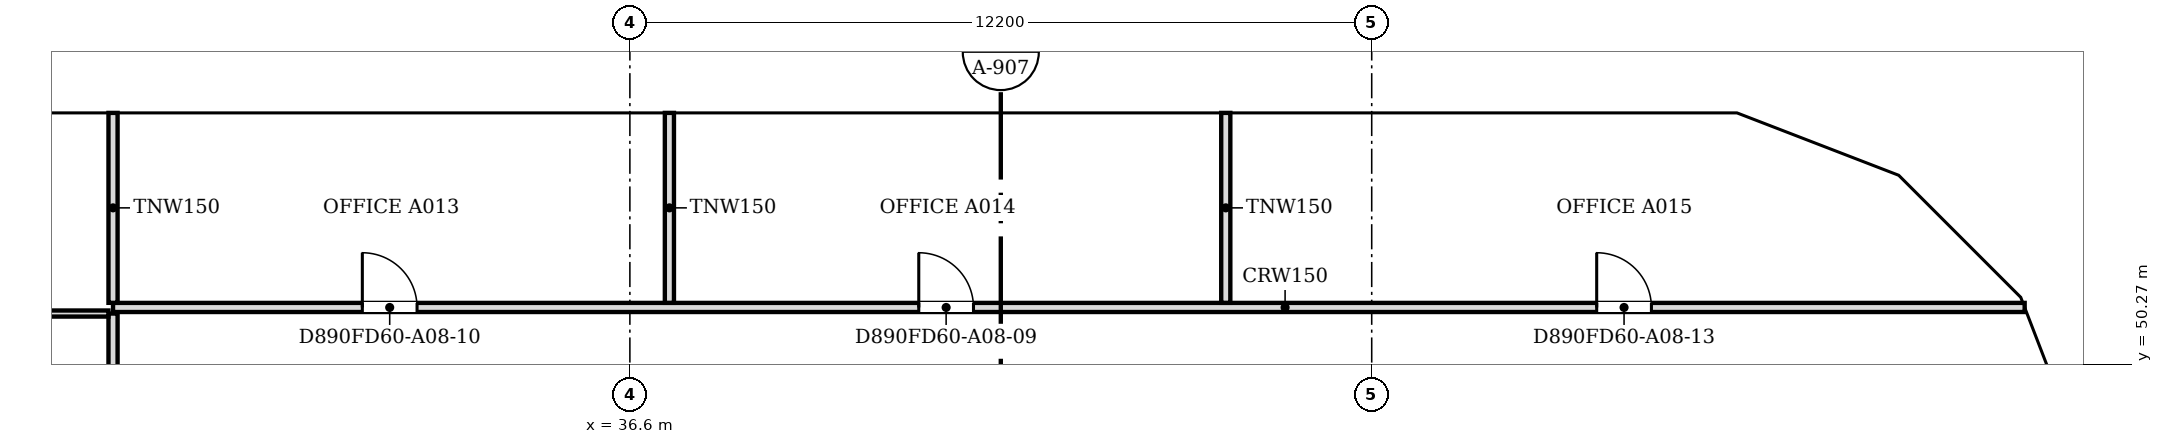
"""IFC4 building model, lengths in metres.
Left out: names, types, materials, properties, quantities, classifications, styles, units other than length and angle.
Written with IfcOpenShell. Run it as: python <this file> out.ifc"""

import sys

from ifc_helpers import new_model, si_unit, direction, frame, frame_2d, origin, place, context, subcontext, project, spatial, polyline, rectangle, outline, extrude, faceted_brep, source, transform, mapped, element, fill, save


model = new_model("IFC4")
c1 = context("Model", 3, precision=1e-05, world=origin(), true_north=direction((0.0, 1.0)))
c2 = subcontext(c1, "Body", "Model", "MODEL_VIEW")
j1 = project(units=[si_unit("LENGTHUNIT", "METRE"), si_unit("PLANEANGLEUNIT", "RADIAN")], contexts=[c1])
p1 = place(None, origin())
s1 = spatial("IfcSite", under=j1, at=p1, CompositionType="ELEMENT")
p2 = place(p1, origin())
s2 = spatial("IfcBuilding", under=s1, at=p2, CompositionType="ELEMENT")
p3 = place(p2, frame((0.0, 0.0, 91.4)))
s3 = spatial("IfcBuildingStorey", under=s2, at=p3, CompositionType="ELEMENT", Elevation=91.4)
m1 = source(origin(), c2, "Body", "Brep", [
    faceted_brep([(2.95, -0.25, 0.0), (3.003, -0.25, 0.068), (3.003, -0.25, 7.531), (2.95, -0.25, 7.6), (0.0, -0.25, 3.8), (0.047, 0.25, 3.86), (2.898, 0.25, 7.532), (2.898, 0.25, 0.068), (0.047, 0.25, 3.74), (2.95, 0.0, 0.0), (2.95, 0.0, 7.6), (0.0, 0.0, 3.8)], [[[0, 1, 2, 3, 4]], [[5, 6, 7, 8]], [[1, 0, 9]], [[10, 3, 2]], [[6, 5, 11, 4, 3, 10]], [[8, 7, 9, 0, 4, 11]], [[8, 11, 5]], [[1, 9, 7, 6, 10, 2]]]),
])
p4 = place(p3, frame((60.75, 48.753, -3.8), z_axis=(0.0, 0.0, 1.0), x_axis=(-0.35992665181, 0.932980602862, 0.0)))
e1 = element("IfcWall", 1, at=p4, inside=s3, PredefinedType="SOLIDWALL", context=c2, shape_type="MappedRepresentation", body=[
    mapped(m1, transform((0.0, 0.0, 0.0), scale=1.0)),
])
m2 = source(origin(), c2, "Body", "SweptSolid", [
    extrude(outline(polyline([(2.75, 6.935), (0.316, 3.8), (2.75, 0.665), (2.75, 6.935)])), frame((0.0, 0.26, 0.0), z_axis=(0.0, -1.0, 0.0), x_axis=(1.0, 0.0, 0.0)), (0.0, 0.0, 1.0), 0.52),
])
p5 = place(p4, origin())
e2 = element("IfcOpeningElement", 2, at=p5, cuts=e1, PredefinedType="OPENING", context=c2, shape_type="MappedRepresentation", body=[
    mapped(m2, transform((0.0, 0.0, 0.0), scale=1.0)),
])
m3 = source(origin(), c2, "Body", "Brep", [
    faceted_brep([(0.053, -0.25, 0.0), (2.997, -0.25, 3.8), (0.053, -0.25, 7.6), (0.0, -0.25, 7.532), (0.0, -0.25, 0.068), (0.106, 0.25, 7.531), (2.944, 0.25, 3.868), (2.944, 0.25, 3.732), (0.106, 0.25, 0.068), (2.997, 0.0, 3.8), (0.053, 0.0, 0.0), (0.053, 0.0, 7.6)], [[[0, 1, 2, 3, 4]], [[5, 6, 7, 8]], [[8, 7, 9, 1, 0, 10]], [[6, 5, 11, 2, 1, 9]], [[3, 2, 11]], [[10, 0, 4]], [[8, 10, 4, 3, 11, 5]], [[9, 7, 6]]]),
])
p6 = place(p3, frame((59.726, 51.469, -3.8), z_axis=(0.0, 0.0, 1.0), x_axis=(-0.707106781187, 0.707106781187, 0.0)))
e3 = element("IfcWall", 3, at=p6, inside=s3, PredefinedType="SOLIDWALL", context=c2, shape_type="MappedRepresentation", body=[
    mapped(m3, transform((0.0, 0.0, 0.0), scale=1.0)),
])
m4 = source(origin(), c2, "Body", "SweptSolid", [
    extrude(outline(polyline([(0.253, 0.666), (2.681, 3.8), (0.253, 6.934), (0.253, 0.666)])), frame((0.0, 0.26, 0.0), z_axis=(0.0, -1.0, 0.0), x_axis=(1.0, 0.0, 0.0)), (0.0, 0.0, 1.0), 0.52),
])
p7 = place(p6, origin())
e4 = element("IfcOpeningElement", 4, at=p7, cuts=e3, PredefinedType="OPENING", context=c2, shape_type="MappedRepresentation", body=[
    mapped(m4, transform((0.0, 0.0, 0.0), scale=1.0)),
])
m5 = source(origin(), c2, "Body", "Brep", [
    faceted_brep([(2.95, -0.25, 0.0), (2.997, -0.25, 0.059), (2.997, -0.25, 7.541), (2.95, -0.25, 7.6), (0.0, -0.25, 3.8), (0.053, 0.25, 3.868), (2.904, 0.25, 7.54), (2.904, 0.25, 0.06), (0.053, 0.25, 3.732), (2.95, 0.0, 0.0), (2.95, 0.0, 7.6), (0.0, 0.0, 3.8)], [[[0, 1, 2, 3, 4]], [[5, 6, 7, 8]], [[1, 0, 9]], [[10, 3, 2]], [[6, 5, 11, 4, 3, 10]], [[8, 7, 9, 0, 4, 11]], [[8, 11, 5]], [[1, 9, 7, 6, 10, 2]]]),
])
p8 = place(p3, frame((57.606, 53.588, -3.8), z_axis=(0.0, 0.0, 1.0), x_axis=(-0.932990326376, 0.359901446078, 0.0)))
e5 = element("IfcWall", 5, at=p8, inside=s3, PredefinedType="SOLIDWALL", context=c2, shape_type="MappedRepresentation", body=[
    mapped(m5, transform((0.0, 0.0, 0.0), scale=1.0)),
])
p9 = place(p8, origin())
e6 = element("IfcOpeningElement", 6, at=p9, cuts=e5, PredefinedType="OPENING", context=c2, shape_type="MappedRepresentation", body=[
    mapped(m2, transform((0.0, 0.0, 0.0), scale=1.0)),
])
m6 = source(origin(), c2, "Body", "Brep", [
    faceted_brep([(0.047, -0.25, 0.0), (3.05, -0.25, 3.8), (0.047, -0.25, 7.6), (0.0, -0.25, 7.54), (0.0, -0.25, 0.06), (0.093, 0.25, 7.541), (3.05, 0.25, 3.8), (0.093, 0.25, 0.059), (0.047, 0.0, 0.0), (0.047, 0.0, 7.6)], [[[0, 1, 2, 3, 4]], [[5, 6, 7]], [[7, 6, 1, 0, 8]], [[6, 5, 9, 2, 1]], [[3, 2, 9]], [[8, 0, 4]], [[7, 8, 4, 3, 9, 5]]]),
])
p10 = place(p3, frame((54.9, 54.65, -3.8), z_axis=(0.0, 0.0, 1.0), x_axis=(-1.0, 0.0, 0.0)))
e7 = element("IfcWall", 7, at=p10, inside=s3, PredefinedType="SOLIDWALL", context=c2, shape_type="MappedRepresentation", body=[
    mapped(m6, transform((0.0, 0.0, 0.0), scale=1.0)),
])
m7 = source(origin(), c2, "Body", "SweptSolid", [
    extrude(outline(polyline([(0.247, 0.656), (2.731, 3.8), (0.247, 6.944), (0.247, 0.656)])), frame((0.0, 0.26, 0.0), z_axis=(0.0, -1.0, 0.0), x_axis=(1.0, 0.0, 0.0)), (0.0, 0.0, 1.0), 0.52),
])
p11 = place(p10, origin())
e8 = element("IfcOpeningElement", 8, at=p11, cuts=e7, PredefinedType="OPENING", context=c2, shape_type="MappedRepresentation", body=[
    mapped(m7, transform((0.0, 0.0, 0.0), scale=1.0)),
])
m8 = source(origin(), c2, "Body", "SweptSolid", [
    extrude(outline(polyline([(3.05, 0.0), (6.1, 3.8), (3.05, 7.6), (0.0, 3.8), (3.05, 0.0)])), frame((0.0, 0.25, 0.0), z_axis=(0.0, -1.0, 0.0), x_axis=(1.0, 0.0, 0.0)), (0.0, 0.0, 1.0), 0.5),
])
p12 = place(p3, frame((51.85, 54.65, -3.8), z_axis=(0.0, 0.0, 1.0), x_axis=(-1.0, 0.0, 0.0)))
e9 = element("IfcWall", 9, at=p12, inside=s3, PredefinedType="SOLIDWALL", context=c2, shape_type="MappedRepresentation", body=[
    mapped(m8, transform((0.0, 0.0, 0.0), scale=1.0)),
])
m9 = source(origin(), c2, "Body", "SweptSolid", [
    extrude(outline(polyline([(3.05, 0.399), (5.78, 3.8), (3.05, 7.2), (0.321, 3.8), (3.05, 0.399)])), frame((0.0, 0.26, 0.0), z_axis=(0.0, -1.0, 0.0), x_axis=(1.0, 0.0, 0.0)), (0.0, 0.0, 1.0), 0.52),
])
p13 = place(p12, origin())
e10 = element("IfcOpeningElement", 10, at=p13, cuts=e9, PredefinedType="OPENING", context=c2, shape_type="MappedRepresentation", body=[
    mapped(m9, transform((0.0, 0.0, 0.0), scale=1.0)),
])
p14 = place(p3, frame((45.75, 54.65, -3.8), z_axis=(0.0, 0.0, 1.0), x_axis=(-1.0, 0.0, 0.0)))
e11 = element("IfcWall", 11, at=p14, inside=s3, PredefinedType="SOLIDWALL", context=c2, shape_type="MappedRepresentation", body=[
    mapped(m8, transform((0.0, 0.0, 0.0), scale=1.0)),
])
p15 = place(p14, origin())
e12 = element("IfcOpeningElement", 12, at=p15, cuts=e11, PredefinedType="OPENING", context=c2, shape_type="MappedRepresentation", body=[
    mapped(m9, transform((0.0, 0.0, 0.0), scale=1.0)),
])
m10 = source(origin(), c2, "Body", "Brep", [
    faceted_brep([(3.05, -0.25, 0.0), (6.1, -0.25, 3.8), (6.1, -0.25, 3.8), (3.05, -0.25, 7.6), (0.0, -0.25, 3.8), (0.0, 0.25, 3.8), (3.05, 0.25, 7.6), (6.1, 0.25, 3.8), (6.1, 0.25, 3.8), (3.05, 0.25, 0.0)], [[[0, 1, 2, 3, 4]], [[5, 6, 7, 8, 9]], [[9, 8, 1, 0]], [[7, 6, 3, 2]], [[6, 5, 4, 3]], [[5, 9, 0, 4]], [[1, 8, 7, 2]]]),
])
p16 = place(p3, frame((39.65, 54.65, -3.8), z_axis=(0.0, 0.0, 1.0), x_axis=(-1.0, 0.0, 0.0)))
e13 = element("IfcWall", 13, at=p16, inside=s3, PredefinedType="SOLIDWALL", context=c2, shape_type="MappedRepresentation", body=[
    mapped(m10, transform((0.0, 0.0, 0.0), scale=1.0)),
])
p17 = place(p16, origin())
e14 = element("IfcOpeningElement", 14, at=p17, cuts=e13, PredefinedType="OPENING", context=c2, shape_type="MappedRepresentation", body=[
    mapped(m9, transform((0.0, 0.0, 0.0), scale=1.0)),
])
p18 = place(p3, frame((33.55, 54.65, -3.8), z_axis=(0.0, 0.0, 1.0), x_axis=(-1.0, 0.0, 0.0)))
e15 = element("IfcWall", 15, at=p18, inside=s3, PredefinedType="SOLIDWALL", context=c2, shape_type="MappedRepresentation", body=[
    mapped(m8, transform((0.0, 0.0, 0.0), scale=1.0)),
])
p19 = place(p18, origin())
e16 = element("IfcOpeningElement", 16, at=p19, cuts=e15, PredefinedType="OPENING", context=c2, shape_type="MappedRepresentation", body=[
    mapped(m9, transform((0.0, 0.0, 0.0), scale=1.0)),
])
p20 = place(p3, frame((27.45, 54.65, -3.8), z_axis=(0.0, 0.0, 1.0), x_axis=(-1.0, 0.0, 0.0)))
e17 = element("IfcWall", 17, at=p20, inside=s3, PredefinedType="SOLIDWALL", context=c2, shape_type="MappedRepresentation", body=[
    mapped(m10, transform((0.0, 0.0, 0.0), scale=1.0)),
])
p21 = place(p20, origin())
e18 = element("IfcOpeningElement", 18, at=p21, cuts=e17, PredefinedType="OPENING", context=c2, shape_type="MappedRepresentation", body=[
    mapped(m9, transform((0.0, 0.0, 0.0), scale=1.0)),
])
p22 = place(p2, frame((0.0, 0.0, 95.2)))
s4 = spatial("IfcBuildingStorey", under=s2, at=p22, CompositionType="ELEMENT", Elevation=95.2)
m11 = source(origin(), c2, "Body", "Brep", [
    faceted_brep([(0.047, -0.25, 0.0), (2.997, -0.25, 3.8), (0.047, -0.25, 7.6), (0.0, -0.25, 7.541), (0.0, -0.25, 0.059), (0.093, 0.25, 7.54), (2.944, 0.25, 3.868), (2.944, 0.25, 3.732), (0.093, 0.25, 0.06), (2.997, 0.0, 3.8), (0.047, 0.0, 0.0), (0.047, 0.0, 7.6)], [[[0, 1, 2, 3, 4]], [[5, 6, 7, 8]], [[8, 7, 9, 1, 0, 10]], [[6, 5, 11, 2, 1, 9]], [[3, 2, 11]], [[10, 0, 4]], [[8, 10, 4, 3, 11, 5]], [[9, 7, 6]]]),
])
p23 = place(p22, frame((60.767, 48.71, -3.8), z_axis=(0.0, 0.0, 1.0), x_axis=(-0.359901446078, 0.932990326376, 0.0)))
e19 = element("IfcWall", 19, at=p23, inside=s4, PredefinedType="SOLIDWALL", context=c2, shape_type="MappedRepresentation", body=[
    mapped(m11, transform((0.0, 0.0, 0.0), scale=1.0)),
])
m12 = source(origin(), c2, "Body", "SweptSolid", [
    extrude(outline(polyline([(0.247, 0.665), (2.681, 3.8), (0.247, 6.935), (0.247, 0.665)])), frame((0.0, 0.26, 0.0), z_axis=(0.0, -1.0, 0.0), x_axis=(1.0, 0.0, 0.0)), (0.0, 0.0, 1.0), 0.52),
])
p24 = place(p23, origin())
e20 = element("IfcOpeningElement", 20, at=p24, cuts=e19, PredefinedType="OPENING", context=c2, shape_type="MappedRepresentation", body=[
    mapped(m12, transform((0.0, 0.0, 0.0), scale=1.0)),
])
m13 = source(origin(), c2, "Body", "Brep", [
    faceted_brep([(2.944, -0.25, 0.0), (2.997, -0.25, 0.068), (2.997, -0.25, 7.532), (2.944, -0.25, 7.6), (0.0, -0.25, 3.8), (0.053, 0.25, 3.868), (2.891, 0.25, 7.532), (2.891, 0.25, 0.068), (0.053, 0.25, 3.732), (2.944, 0.0, 0.0), (2.944, 0.0, 7.6), (0.0, 0.0, 3.8)], [[[0, 1, 2, 3, 4]], [[5, 6, 7, 8]], [[1, 0, 9]], [[10, 3, 2]], [[6, 5, 11, 4, 3, 10]], [[8, 7, 9, 0, 4, 11]], [[8, 11, 5]], [[1, 9, 7, 6, 10, 2]]]),
])
p25 = place(p22, frame((59.688, 51.506, -3.8), z_axis=(0.0, 0.0, 1.0), x_axis=(-0.707106781187, 0.707106781187, 0.0)))
e21 = element("IfcWall", 21, at=p25, inside=s4, PredefinedType="SOLIDWALL", context=c2, shape_type="MappedRepresentation", body=[
    mapped(m13, transform((0.0, 0.0, 0.0), scale=1.0)),
])
m14 = source(origin(), c2, "Body", "SweptSolid", [
    extrude(outline(polyline([(2.744, 6.934), (0.316, 3.8), (2.744, 0.667), (2.744, 6.934)])), frame((0.0, 0.26, 0.0), z_axis=(0.0, -1.0, 0.0), x_axis=(1.0, 0.0, 0.0)), (0.0, 0.0, 1.0), 0.52),
])
p26 = place(p25, origin())
e22 = element("IfcOpeningElement", 22, at=p26, cuts=e21, PredefinedType="OPENING", context=c2, shape_type="MappedRepresentation", body=[
    mapped(m14, transform((0.0, 0.0, 0.0), scale=1.0)),
])
m15 = source(origin(), c2, "Body", "Brep", [
    faceted_brep([(0.053, -0.25, 0.0), (3.003, -0.25, 3.8), (0.053, -0.25, 7.6), (0.0, -0.25, 7.532), (0.0, -0.25, 0.068), (0.106, 0.25, 7.532), (2.957, 0.25, 3.86), (2.957, 0.25, 3.74), (0.106, 0.25, 0.068), (3.003, 0.0, 3.8), (0.053, 0.0, 0.0), (0.053, 0.0, 7.6)], [[[0, 1, 2, 3, 4]], [[5, 6, 7, 8]], [[8, 7, 9, 1, 0, 10]], [[6, 5, 11, 2, 1, 9]], [[3, 2, 11]], [[10, 0, 4]], [[8, 10, 4, 3, 11, 5]], [[9, 7, 6]]]),
])
p27 = place(p22, frame((57.656, 53.569, -3.8), z_axis=(0.0, 0.0, 1.0), x_axis=(-0.933007896601, 0.359855894603, 0.0)))
e23 = element("IfcWall", 23, at=p27, inside=s4, PredefinedType="SOLIDWALL", context=c2, shape_type="MappedRepresentation", body=[
    mapped(m15, transform((0.0, 0.0, 0.0), scale=1.0)),
])
m16 = source(origin(), c2, "Body", "SweptSolid", [
    extrude(outline(polyline([(0.253, 0.665), (2.687, 3.8), (0.253, 6.935), (0.253, 0.665)])), frame((0.0, 0.26, 0.0), z_axis=(0.0, -1.0, 0.0), x_axis=(1.0, 0.0, 0.0)), (0.0, 0.0, 1.0), 0.52),
])
p28 = place(p27, origin())
e24 = element("IfcOpeningElement", 24, at=p28, cuts=e23, PredefinedType="OPENING", context=c2, shape_type="MappedRepresentation", body=[
    mapped(m16, transform((0.0, 0.0, 0.0), scale=1.0)),
])
m17 = source(origin(), c2, "Body", "Brep", [
    faceted_brep([(3.003, -0.25, 0.0), (6.053, -0.25, 3.8), (3.003, -0.25, 7.6), (0.0, -0.25, 3.8), (0.047, 0.25, 3.859), (3.003, 0.25, 7.6), (6.053, 0.25, 3.8), (3.003, 0.25, 0.0), (0.047, 0.25, 3.741), (0.0, 0.0, 3.8)], [[[0, 1, 2, 3]], [[4, 5, 6, 7, 8]], [[7, 6, 1, 0]], [[6, 5, 2, 1]], [[5, 4, 9, 3, 2]], [[8, 7, 0, 3, 9]], [[8, 9, 4]]]),
])
p29 = place(p22, frame((54.854, 54.65, -3.8), z_axis=(0.0, 0.0, 1.0), x_axis=(-1.0, 0.0, 0.0)))
e25 = element("IfcWall", 25, at=p29, inside=s4, PredefinedType="SOLIDWALL", context=c2, shape_type="MappedRepresentation", body=[
    mapped(m17, transform((0.0, 0.0, 0.0), scale=1.0)),
])
m18 = source(origin(), c2, "Body", "SweptSolid", [
    extrude(outline(polyline([(3.005, 0.401), (5.733, 3.8), (3.005, 7.199), (0.319, 3.8), (3.005, 0.401)])), frame((0.0, 0.26, 0.0), z_axis=(0.0, -1.0, 0.0), x_axis=(1.0, 0.0, 0.0)), (0.0, 0.0, 1.0), 0.52),
])
p30 = place(p29, origin())
e26 = element("IfcOpeningElement", 26, at=p30, cuts=e25, PredefinedType="OPENING", context=c2, shape_type="MappedRepresentation", body=[
    mapped(m18, transform((0.0, 0.0, 0.0), scale=1.0)),
])
m19 = source(origin(), c2, "Body", "SweptSolid", [
    extrude(outline(polyline([(3.05, 0.0), (6.1, 3.8), (3.05, 7.6), (0.0, 3.8), (3.05, 0.0)])), frame((0.0, 0.25, 0.0), z_axis=(0.0, -1.0, 0.0), x_axis=(1.0, 0.0, 0.0)), (0.0, 0.0, 1.0), 0.5),
])
p31 = place(p22, frame((48.8, 54.65, -3.8), z_axis=(0.0, 0.0, 1.0), x_axis=(-1.0, 0.0, 0.0)))
e27 = element("IfcWall", 27, at=p31, inside=s4, PredefinedType="SOLIDWALL", context=c2, shape_type="MappedRepresentation", body=[
    mapped(m19, transform((0.0, 0.0, 0.0), scale=1.0)),
])
m20 = source(origin(), c2, "Body", "SweptSolid", [
    extrude(outline(polyline([(3.05, 0.399), (5.78, 3.8), (3.05, 7.201), (0.321, 3.8), (3.05, 0.399)])), frame((0.0, 0.26, 0.0), z_axis=(0.0, -1.0, 0.0), x_axis=(1.0, 0.0, 0.0)), (0.0, 0.0, 1.0), 0.52),
])
p32 = place(p31, origin())
e28 = element("IfcOpeningElement", 28, at=p32, cuts=e27, PredefinedType="OPENING", context=c2, shape_type="MappedRepresentation", body=[
    mapped(m20, transform((0.0, 0.0, 0.0), scale=1.0)),
])
m21 = source(origin(), c2, "Body", "Brep", [
    faceted_brep([(3.05, -0.25, 0.0), (6.1, -0.25, 3.8), (6.1, -0.25, 3.8), (3.05, -0.25, 7.6), (0.0, -0.25, 3.8), (0.0, 0.25, 3.8), (3.05, 0.25, 7.6), (6.1, 0.25, 3.8), (6.1, 0.25, 3.8), (3.05, 0.25, 0.0)], [[[0, 1, 2, 3, 4]], [[5, 6, 7, 8, 9]], [[9, 8, 1, 0]], [[7, 6, 3, 2]], [[6, 5, 4, 3]], [[5, 9, 0, 4]], [[1, 8, 7, 2]]]),
])
p33 = place(p22, frame((42.7, 54.65, -3.8), z_axis=(0.0, 0.0, 1.0), x_axis=(-1.0, 0.0, 0.0)))
e29 = element("IfcWall", 29, at=p33, inside=s4, PredefinedType="SOLIDWALL", context=c2, shape_type="MappedRepresentation", body=[
    mapped(m21, transform((0.0, 0.0, 0.0), scale=1.0)),
])
p34 = place(p33, origin())
e30 = element("IfcOpeningElement", 30, at=p34, cuts=e29, PredefinedType="OPENING", context=c2, shape_type="MappedRepresentation", body=[
    mapped(m20, transform((0.0, 0.0, 0.0), scale=1.0)),
])
p35 = place(p22, frame((36.6, 54.65, -3.8), z_axis=(0.0, 0.0, 1.0), x_axis=(-1.0, 0.0, 0.0)))
e31 = element("IfcWall", 31, at=p35, inside=s4, PredefinedType="SOLIDWALL", context=c2, shape_type="MappedRepresentation", body=[
    mapped(m19, transform((0.0, 0.0, 0.0), scale=1.0)),
])
p36 = place(p35, origin())
e32 = element("IfcOpeningElement", 32, at=p36, cuts=e31, PredefinedType="OPENING", context=c2, shape_type="MappedRepresentation", body=[
    mapped(m20, transform((0.0, 0.0, 0.0), scale=1.0)),
])
p37 = place(p22, frame((30.5, 54.65, -3.8), z_axis=(0.0, 0.0, 1.0), x_axis=(-1.0, 0.0, 0.0)))
e33 = element("IfcWall", 33, at=p37, inside=s4, PredefinedType="SOLIDWALL", context=c2, shape_type="MappedRepresentation", body=[
    mapped(m19, transform((0.0, 0.0, 0.0), scale=1.0)),
])
p38 = place(p37, origin())
e34 = element("IfcOpeningElement", 34, at=p38, cuts=e33, PredefinedType="OPENING", context=c2, shape_type="MappedRepresentation", body=[
    mapped(m20, transform((0.0, 0.0, 0.0), scale=1.0)),
])
p39 = place(p3, frame((28.1, 47.776, 0.0), z_axis=(0.0, 0.0, 1.0), x_axis=(0.0, 1.0, 0.0)))
e35 = element("IfcWall", 35, at=p39, inside=s3, PredefinedType="PARTITIONING", context=c2, shape_type="SweptSolid", body=[
    extrude(rectangle(XDim=3.324, YDim=0.15, at=frame_2d((1.662, 0.0))), origin(), (0.0, 0.0, 1.0), 2.895),
])
p40 = place(p3, frame((19.776, 51.1, 0.0), z_axis=(0.0, 0.0, 1.0), x_axis=(1.0, 0.0, 0.0)))
e36 = element("IfcWall", 36, at=p40, inside=s3, PredefinedType="PARTITIONING", context=c2, shape_type="SweptSolid", body=[
    extrude(rectangle(XDim=8.248, YDim=0.1, at=frame_2d((4.124, 0.0))), origin(), (0.0, 0.0, 1.0), 2.895),
])
m22 = source(origin(), c2, "Body", "SweptSolid", [
    extrude(rectangle(XDim=0.9, YDim=2.1, at=frame_2d((0.45, 1.05))), frame((0.0, 0.06, 0.0), z_axis=(0.0, -1.0, 0.0), x_axis=(1.0, 0.0, 0.0)), (0.0, 0.0, 1.0), 0.12),
])
p41 = place(p40, frame((1.5, 0.0, 0.0)))
e37 = element("IfcOpeningElement", 37, at=p41, cuts=e36, PredefinedType="OPENING", context=c2, shape_type="MappedRepresentation", body=[
    mapped(m22, transform((0.0, 0.0, 0.0), scale=1.0)),
])
p42 = place(p40, frame((5.682, 0.0, 0.0)))
e38 = element("IfcOpeningElement", 38, at=p42, cuts=e36, PredefinedType="OPENING", context=c2, shape_type="MappedRepresentation", body=[
    mapped(m22, transform((0.0, 0.0, 0.0), scale=1.0)),
])
p43 = place(p3, frame((28.1, 51.2, 0.0), z_axis=(0.0, 0.0, 1.0), x_axis=(1.0, 0.0, 0.0)))
e39 = element("IfcWall", 39, at=p43, inside=s3, PredefinedType="PARTITIONING", context=c2, shape_type="SweptSolid", body=[
    extrude(rectangle(XDim=31.438, YDim=0.15, at=frame_2d((15.719, 0.0))), origin(), (0.0, 0.0, 1.0), 2.895),
])
m23 = source(origin(), c2, "Body", "SweptSolid", [
    extrude(rectangle(XDim=0.9, YDim=2.1, at=frame_2d((0.45, 1.05))), frame((0.0, 0.085, 0.0), z_axis=(0.0, -1.0, 0.0), x_axis=(1.0, 0.0, 0.0)), (0.0, 0.0, 1.0), 0.17),
])
p44 = place(p43, frame((13.251, 0.0, 0.0)))
e40 = element("IfcOpeningElement", 40, at=p44, cuts=e39, PredefinedType="OPENING", context=c2, shape_type="MappedRepresentation", body=[
    mapped(m23, transform((0.0, 0.0, 0.0), scale=1.0)),
])
p45 = place(p43, frame((4.1, 0.0, 0.0)))
e41 = element("IfcOpeningElement", 41, at=p45, cuts=e39, PredefinedType="OPENING", context=c2, shape_type="MappedRepresentation", body=[
    mapped(m23, transform((0.0, 0.0, 0.0), scale=1.0)),
])
p46 = place(p43, frame((24.4, 0.0, 0.0)))
e42 = element("IfcOpeningElement", 42, at=p46, cuts=e39, PredefinedType="OPENING", context=c2, shape_type="MappedRepresentation", body=[
    mapped(m23, transform((0.0, 0.0, 0.0), scale=1.0)),
])
for number, where, z_axis, x_axis in (
    (43, (28.1, 51.276, 0.0), (0.0, 0.0, 1.0), (0.0, 1.0, 0.0)),
    (44, (37.25, 51.276, 0.0), (0.0, 0.0, 1.0), (0.0, 1.0, 0.0)),
    (45, (46.4, 51.276, 0.0), (0.0, 0.0, 1.0), (0.0, 1.0, 0.0)),
):
    element("IfcWall", number, at=place(p3, frame(where, z_axis=z_axis, x_axis=x_axis)), inside=s3, PredefinedType="PARTITIONING", context=c2, shape_type="SweptSolid", body=[
        extrude(rectangle(XDim=3.124, YDim=0.15, at=frame_2d((1.562, 0.0))), origin(), (0.0, 0.0, 1.0), 2.895),
    ])
m24 = source(origin(), c2, "Body", "SweptSolid", [
    extrude(rectangle(XDim=0.9, YDim=2.1, at=frame_2d((0.45, 1.05))), frame((0.0, 0.025, 0.0), z_axis=(0.0, -1.0, 0.0), x_axis=(1.0, 0.0, 0.0)), (0.0, 0.0, 1.0), 0.05),
])
p47 = place(p44, origin())
e46 = element("IfcDoor", 46, at=p47, inside=s3, OperationType="SINGLE_SWING_LEFT", PredefinedType="DOOR", context=c2, shape_type="MappedRepresentation", body=[
    mapped(m24, transform((0.0, 0.0, 0.0), scale=1.0)),
])
fill(e40, e46)
p48 = place(p45, origin())
e47 = element("IfcDoor", 47, at=p48, inside=s3, OperationType="SINGLE_SWING_LEFT", PredefinedType="DOOR", context=c2, shape_type="MappedRepresentation", body=[
    mapped(m24, transform((0.0, 0.0, 0.0), scale=1.0)),
])
fill(e41, e47)
p49 = place(p46, origin())
e48 = element("IfcDoor", 48, at=p49, inside=s3, OperationType="SINGLE_SWING_LEFT", PredefinedType="DOOR", context=c2, shape_type="MappedRepresentation", body=[
    mapped(m24, transform((0.0, 0.0, 0.0), scale=1.0)),
])
fill(e42, e48)
save(model, sys.argv[1])
